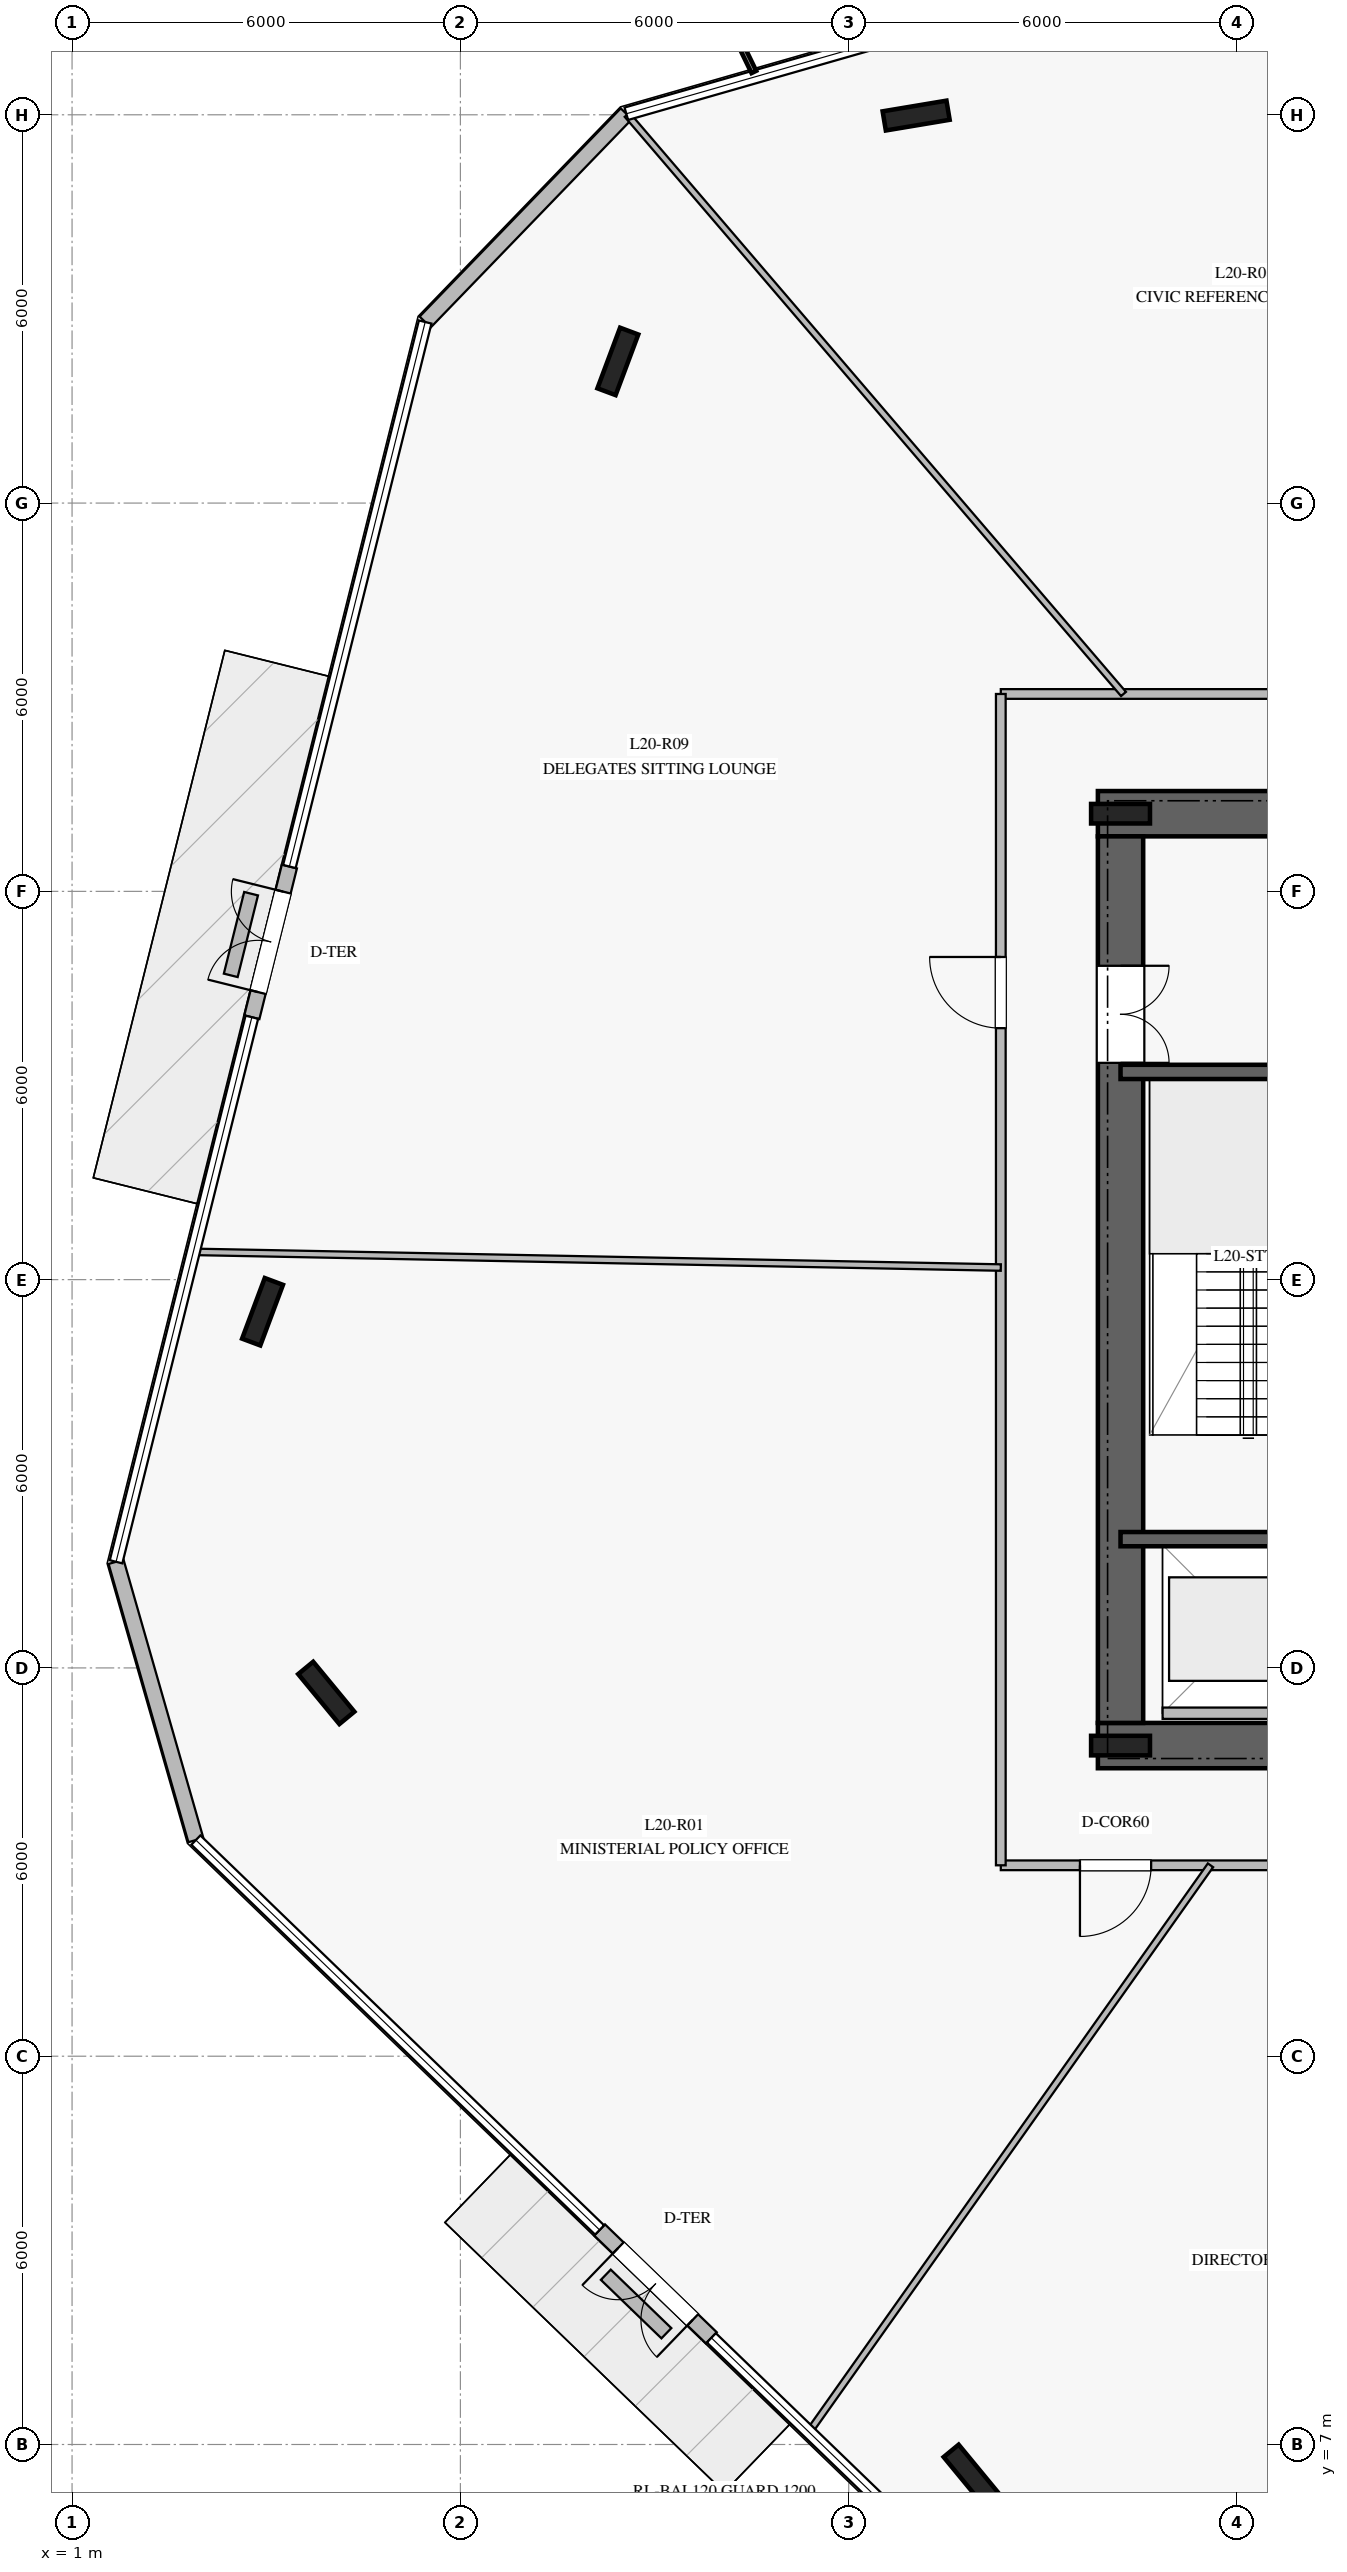
"""IFC4 building model, lengths in metres.
Left out: names, types, materials, properties, quantities, classifications, styles, units other than length and angle.
Written with IfcOpenShell. Run it as: python <this file> out.ifc"""

import sys

from ifc_helpers import new_model, si_unit, direction, frame, frame_2d, origin, origin_2d, place, context, subcontext, project, spatial, rectangle, i_section, extrude, element, fill, save


model = new_model("IFC4")
c1 = context("Model", 3, precision=1e-05, world=origin(), true_north=direction((0.0, 1.0)))
c2 = subcontext(c1, "Body", "Model", "MODEL_VIEW")
j1 = project(units=[si_unit("LENGTHUNIT", "METRE"), si_unit("PLANEANGLEUNIT", "RADIAN")], contexts=[c1])
p1 = place(None, origin())
s1 = spatial("IfcSite", under=j1, at=p1, CompositionType="ELEMENT")
p2 = place(p1, origin())
s2 = spatial("IfcBuilding", under=s1, at=p2, CompositionType="ELEMENT")
p3 = place(p2, frame((0.0, 0.0, 84.0)))
s3 = spatial("IfcBuildingStorey", under=s2, at=p3, CompositionType="ELEMENT", Elevation=84.0)
p4 = place(p3, frame((16.85, 17.8, 0.0), z_axis=(0.0, 0.0, 1.0), x_axis=(1.0, 0.0, 0.0)))
e1 = element("IfcWall", 1, at=p4, inside=s3, PredefinedType="SHEAR", context=c2, shape_type="SweptSolid", body=[
    extrude(rectangle(XDim=16.3, YDim=0.7, at=frame_2d((8.15, 0.0))), origin(), (0.0, 0.0, 1.0), 3.76),
])
p5 = place(p4, frame((5.1, 0.0, 0.0)))
e2 = element("IfcOpeningElement", 2, at=p5, cuts=e1, PredefinedType="OPENING", context=c2, shape_type="SweptSolid", body=[
    extrude(rectangle(XDim=1.2, YDim=2.25, at=frame_2d((0.6, 1.125))), frame((0.0, 0.36, 0.0), z_axis=(0.0, -1.0, 0.0), x_axis=(1.0, 0.0, 0.0)), (0.0, 0.0, 1.0), 0.72),
])
p6 = place(p4, frame((14.05, 0.0, 0.0)))
e3 = element("IfcOpeningElement", 3, at=p6, cuts=e1, PredefinedType="OPENING", context=c2, shape_type="SweptSolid", body=[
    extrude(rectangle(XDim=0.9, YDim=2.1, at=frame_2d((0.45, 1.05))), frame((0.0, 0.36, 0.0), z_axis=(0.0, -1.0, 0.0), x_axis=(1.0, 0.0, 0.0)), (0.0, 0.0, 1.0), 0.72),
])
p7 = place(p4, frame((7.95, 0.0, 0.0)))
e4 = element("IfcOpeningElement", 4, at=p7, cuts=e1, PredefinedType="OPENING", context=c2, shape_type="SweptSolid", body=[
    extrude(rectangle(XDim=1.1, YDim=2.2, at=frame_2d((0.55, 1.1))), frame((0.0, 0.36, 0.0), z_axis=(0.0, -1.0, 0.0), x_axis=(1.0, 0.0, 0.0)), (0.0, 0.0, 1.0), 0.72),
])
p8 = place(p4, frame((9.925, 0.0, 0.0)))
e5 = element("IfcOpeningElement", 5, at=p8, cuts=e1, PredefinedType="OPENING", context=c2, shape_type="SweptSolid", body=[
    extrude(rectangle(XDim=1.1, YDim=2.2, at=frame_2d((0.55, 1.1))), frame((0.0, 0.36, 0.0), z_axis=(0.0, -1.0, 0.0), x_axis=(1.0, 0.0, 0.0)), (0.0, 0.0, 1.0), 0.72),
])
p9 = place(p4, frame((11.9, 0.0, 0.0)))
e6 = element("IfcOpeningElement", 6, at=p9, cuts=e1, PredefinedType="OPENING", context=c2, shape_type="SweptSolid", body=[
    extrude(rectangle(XDim=1.1, YDim=2.2, at=frame_2d((0.55, 1.1))), frame((0.0, 0.36, 0.0), z_axis=(0.0, -1.0, 0.0), x_axis=(1.0, 0.0, 0.0)), (0.0, 0.0, 1.0), 0.72),
])
p10 = place(p3, frame((33.15, 32.2, 0.0), z_axis=(0.0, 0.0, 1.0), x_axis=(-1.0, 0.0, 0.0)))
e7 = element("IfcWall", 7, at=p10, inside=s3, PredefinedType="SHEAR", context=c2, shape_type="SweptSolid", body=[
    extrude(rectangle(XDim=16.3, YDim=0.7, at=frame_2d((8.15, 0.0))), origin(), (0.0, 0.0, 1.0), 3.76),
])
p11 = place(p10, frame((5.1, 0.0, 0.0)))
e8 = element("IfcOpeningElement", 8, at=p11, cuts=e7, PredefinedType="OPENING", context=c2, shape_type="SweptSolid", body=[
    extrude(rectangle(XDim=1.2, YDim=2.25, at=frame_2d((0.6, 1.125))), frame((0.0, 0.36, 0.0), z_axis=(0.0, -1.0, 0.0), x_axis=(1.0, 0.0, 0.0)), (0.0, 0.0, 1.0), 0.72),
])
p12 = place(p3, frame((17.2, 31.85, 0.0), z_axis=(0.0, 0.0, 1.0), x_axis=(0.0, -1.0, 0.0)))
e9 = element("IfcWall", 9, at=p12, inside=s3, PredefinedType="SHEAR", context=c2, shape_type="SweptSolid", body=[
    extrude(rectangle(XDim=13.7, YDim=0.7, at=frame_2d((6.85, 0.0))), origin(), (0.0, 0.0, 1.0), 3.76),
])
p13 = place(p12, frame((2.0, 0.0, 0.0)))
e10 = element("IfcOpeningElement", 10, at=p13, cuts=e9, PredefinedType="OPENING", context=c2, shape_type="SweptSolid", body=[
    extrude(rectangle(XDim=1.5, YDim=2.2, at=frame_2d((0.75, 1.1))), frame((0.0, 0.36, 0.0), z_axis=(0.0, -1.0, 0.0), x_axis=(1.0, 0.0, 0.0)), (0.0, 0.0, 1.0), 0.72),
])
for number, where, z_axis, x_axis in (
    (11, (17.2, 17.8, 0.0), (0.0, 0.0, 1.0), (1.0, 0.0, 0.0)),
    (12, (17.2, 32.2, 0.0), (0.0, 0.0, 1.0), (1.0, 0.0, 0.0)),
):
    element("IfcColumn", number, at=place(p3, frame(where, z_axis=z_axis, x_axis=x_axis)), inside=s3, PredefinedType="COLUMN", context=c2, shape_type="SweptSolid", body=[
        extrude(i_section(OverallWidth=0.302, OverallDepth=0.91, WebThickness=0.021, FlangeThickness=0.04, at=origin_2d()), origin(), (0.0, 0.0, 1.0), 4.0),
    ])
for number, where, z_axis, x_axis in (
    (13, (17.2, 20.99, 0.0), (0.0, 0.0, 1.0), (1.0, 0.0, 0.0)),
    (14, (17.2, 28.21, 0.0), (0.0, 0.0, 1.0), (1.0, 0.0, 0.0)),
):
    element("IfcWall", number, at=place(p3, frame(where, z_axis=z_axis, x_axis=x_axis)), inside=s3, PredefinedType="SOLIDWALL", context=c2, shape_type="SweptSolid", body=[
        extrude(rectangle(XDim=3.72, YDim=0.22, at=frame_2d((1.86, 0.0))), origin(), (0.0, 0.0, 1.0), 3.76),
    ])
for number, where, z_axis, x_axis in (
    (15, (14.042, 42.988, 0.0), (0.0, 0.0, 1.0), (0.986, 0.165, 0.0)),
    (16, (9.433, 39.189, 0.0), (0.0, 0.0, 1.0), (0.35, 0.937, 0.0)),
    (17, (3.943, 24.504, 0.0), (0.0, 0.0, 1.0), (0.35, 0.937, 0.0)),
    (18, (4.928, 18.614, 0.0), (0.0, 0.0, 1.0), (-0.636, 0.772, 0.0)),
    (19, (14.901, 6.516, 0.0), (0.0, 0.0, 1.0), (-0.636, 0.772, 0.0)),
):
    element("IfcColumn", number, at=place(p3, frame(where, z_axis=z_axis, x_axis=x_axis)), inside=s3, PredefinedType="COLUMN", context=c2, shape_type="SweptSolid", body=[
        extrude(i_section(OverallWidth=0.3, OverallDepth=1.0, WebThickness=0.019, FlangeThickness=0.036, at=origin_2d()), origin(), (0.0, 0.0, 1.0), 4.0),
    ])
p14 = place(p3, frame((9.564, 43.016, 0.0), z_axis=(0.0, 0.0, 1.0), x_axis=(-0.694693843806, -0.719305542435, 0.0)))
e20 = element("IfcWall", 20, at=p14, inside=s3, PredefinedType="STANDARD", context=c2, shape_type="SweptSolid", body=[
    extrude(rectangle(XDim=4.474, YDim=0.24, at=frame_2d((2.237, 0.0))), origin(), (0.0, 0.0, 1.0), 3.76),
])
p15 = place(p3, frame((4.358, 31.384, 0.0), z_axis=(0.0, 0.0, 1.0), x_axis=(-0.241578169312, -0.970381362204, 0.0)))
e21 = element("IfcWall", 21, at=p15, inside=s3, PredefinedType="STANDARD", context=c2, shape_type="SweptSolid", body=[
    extrude(rectangle(XDim=2.4, YDim=0.24, at=frame_2d((1.2, 0.0))), origin(), (0.0, 0.0, 1.0), 3.76),
])
p16 = place(p15, frame((0.4, 0.0, 0.0)))
e22 = element("IfcOpeningElement", 22, at=p16, cuts=e21, PredefinedType="OPENING", context=c2, shape_type="SweptSolid", body=[
    extrude(rectangle(XDim=1.6, YDim=2.25, at=frame_2d((0.8, 1.125))), frame((0.0, 0.13, 0.0), z_axis=(0.0, -1.0, 0.0), x_axis=(1.0, 0.0, 0.0)), (0.0, 0.0, 1.0), 0.26),
])
p17 = place(p3, frame((1.68, 20.64, 0.0), z_axis=(0.0, 0.0, 1.0), x_axis=(0.275679732289, -0.96124954367, 0.0)))
e23 = element("IfcWall", 23, at=p17, inside=s3, PredefinedType="STANDARD", context=c2, shape_type="SweptSolid", body=[
    extrude(rectangle(XDim=4.473, YDim=0.24, at=frame_2d((2.237, 0.0))), origin(), (0.0, 0.0, 1.0), 3.76),
])
p18 = place(p3, frame((9.151, 10.315, 0.0), z_axis=(0.0, 0.0, 1.0), x_axis=(0.719506606337, -0.694485596278, 0.0)))
e24 = element("IfcWall", 24, at=p18, inside=s3, PredefinedType="STANDARD", context=c2, shape_type="SweptSolid", body=[
    extrude(rectangle(XDim=2.4, YDim=0.24, at=frame_2d((1.2, 0.0))), origin(), (0.0, 0.0, 1.0), 3.76),
])
p19 = place(p18, frame((0.4, 0.0, 0.0)))
e25 = element("IfcOpeningElement", 25, at=p19, cuts=e24, PredefinedType="OPENING", context=c2, shape_type="SweptSolid", body=[
    extrude(rectangle(XDim=1.6, YDim=2.25, at=frame_2d((0.8, 1.125))), frame((0.0, 0.13, 0.0), z_axis=(0.0, -1.0, 0.0), x_axis=(1.0, 0.0, 0.0)), (0.0, 0.0, 1.0), 0.26),
])
p20 = place(p3, frame((9.247, 9.623, 0.0), z_axis=(0.0, 0.0, 1.0), x_axis=(0.719288309138, -0.694711687204, 0.0)))
e26 = element("IfcWall", 26, at=p20, inside=s3, PredefinedType="USERDEFINED", context=c2, shape_type="SweptSolid", body=[
    extrude(rectangle(XDim=1.301, YDim=0.22, at=frame_2d((0.651, 0.0))), origin(), (0.0, 0.0, 1.0), 0.4),
])
p21 = place(p3, frame((3.766, 30.964, 0.0), z_axis=(0.0, 0.0, 1.0), x_axis=(-0.241563903991, -0.970384913469, 0.0)))
e27 = element("IfcWall", 27, at=p21, inside=s3, PredefinedType="USERDEFINED", context=c2, shape_type="SweptSolid", body=[
    extrude(rectangle(XDim=1.301, YDim=0.22, at=frame_2d((0.65, 0.0))), origin(), (0.0, 0.0, 1.0), 0.4),
])
p22 = place(p3, frame((17.85, 18.3, 0.0), z_axis=(0.0, 0.0, 1.0), x_axis=(1.0, 0.0, 0.0)))
e28 = element("IfcWall", 28, at=p22, inside=s3, PredefinedType="PARTITIONING", context=c2, shape_type="SweptSolid", body=[
    extrude(rectangle(XDim=2.6, YDim=0.175, at=frame_2d((1.3, 0.0))), origin(), (0.0, 0.0, 1.0), 3.76),
])
p23 = place(p3, frame((15.35, 34.05, 0.0), z_axis=(0.0, 0.0, 1.0), x_axis=(1.0, 0.0, 0.0)))
e29 = element("IfcWall", 29, at=p23, inside=s3, PredefinedType="PARTITIONING", context=c2, shape_type="SweptSolid", body=[
    extrude(rectangle(XDim=19.3, YDim=0.15, at=frame_2d((9.65, 0.0))), origin(), (0.0, 0.0, 1.0), 3.21),
])
p24 = place(p23, frame((16.977, 0.0, 0.0)))
e30 = element("IfcOpeningElement", 30, at=p24, cuts=e29, PredefinedType="OPENING", context=c2, shape_type="SweptSolid", body=[
    extrude(rectangle(XDim=1.1, YDim=2.2, at=frame_2d((0.55, 1.1))), frame((0.0, 0.085, 0.0), z_axis=(0.0, -1.0, 0.0), x_axis=(1.0, 0.0, 0.0)), (0.0, 0.0, 1.0), 0.17),
])
p25 = place(p23, frame((11.996, 0.0, 0.0)))
e31 = element("IfcOpeningElement", 31, at=p25, cuts=e29, PredefinedType="OPENING", context=c2, shape_type="SweptSolid", body=[
    extrude(rectangle(XDim=1.1, YDim=2.2, at=frame_2d((0.55, 1.1))), frame((0.0, 0.085, 0.0), z_axis=(0.0, -1.0, 0.0), x_axis=(1.0, 0.0, 0.0)), (0.0, 0.0, 1.0), 0.17),
])
p26 = place(p23, frame((4.847, 0.0, 0.0)))
e32 = element("IfcOpeningElement", 32, at=p26, cuts=e29, PredefinedType="OPENING", context=c2, shape_type="SweptSolid", body=[
    extrude(rectangle(XDim=1.1, YDim=2.2, at=frame_2d((0.55, 1.1))), frame((0.0, 0.085, 0.0), z_axis=(0.0, -1.0, 0.0), x_axis=(1.0, 0.0, 0.0)), (0.0, 0.0, 1.0), 0.17),
])
p27 = place(p3, frame((34.65, 15.95, 0.0), z_axis=(0.0, 0.0, 1.0), x_axis=(-1.0, 0.0, 0.0)))
e33 = element("IfcWall", 33, at=p27, inside=s3, PredefinedType="PARTITIONING", context=c2, shape_type="SweptSolid", body=[
    extrude(rectangle(XDim=19.3, YDim=0.15, at=frame_2d((9.65, 0.0))), origin(), (0.0, 0.0, 1.0), 3.21),
])
p28 = place(p27, frame((16.977, 0.0, 0.0)))
e34 = element("IfcOpeningElement", 34, at=p28, cuts=e33, PredefinedType="OPENING", context=c2, shape_type="SweptSolid", body=[
    extrude(rectangle(XDim=1.1, YDim=2.2, at=frame_2d((0.55, 1.1))), frame((0.0, 0.085, 0.0), z_axis=(0.0, -1.0, 0.0), x_axis=(1.0, 0.0, 0.0)), (0.0, 0.0, 1.0), 0.17),
])
p29 = place(p27, frame((11.66, 0.0, 0.0)))
e35 = element("IfcOpeningElement", 35, at=p29, cuts=e33, PredefinedType="OPENING", context=c2, shape_type="SweptSolid", body=[
    extrude(rectangle(XDim=1.1, YDim=2.2, at=frame_2d((0.55, 1.1))), frame((0.0, 0.085, 0.0), z_axis=(0.0, -1.0, 0.0), x_axis=(1.0, 0.0, 0.0)), (0.0, 0.0, 1.0), 0.17),
])
p30 = place(p3, frame((15.35, 15.95, 0.0), z_axis=(0.0, 0.0, 1.0), x_axis=(0.0, 1.0, 0.0)))
e36 = element("IfcWall", 36, at=p30, inside=s3, PredefinedType="PARTITIONING", context=c2, shape_type="SweptSolid", body=[
    extrude(rectangle(XDim=18.1, YDim=0.15, at=frame_2d((9.05, 0.0))), origin(), (0.0, 0.0, 1.0), 3.21),
])
p31 = place(p30, frame((12.936, 0.0, 0.0)))
e37 = element("IfcOpeningElement", 37, at=p31, cuts=e36, PredefinedType="OPENING", context=c2, shape_type="SweptSolid", body=[
    extrude(rectangle(XDim=1.1, YDim=2.2, at=frame_2d((0.55, 1.1))), frame((0.0, 0.085, 0.0), z_axis=(0.0, -1.0, 0.0), x_axis=(1.0, 0.0, 0.0)), (0.0, 0.0, 1.0), 0.17),
])
p32 = place(p3, frame((17.246, 34.05, 0.0), z_axis=(0.0, 0.0, 1.0), x_axis=(-0.650642961781, 0.759383787215, 0.0)))
e38 = element("IfcWall", 38, at=p32, inside=s3, PredefinedType="MOVABLE", context=c2, shape_type="SweptSolid", body=[
    extrude(rectangle(XDim=11.787, YDim=0.1, at=frame_2d((5.894, 0.0))), origin(), (0.0, 0.0, 1.0), 3.06),
])
p33 = place(p3, frame((15.35, 25.187, 0.0), z_axis=(0.0, 0.0, 1.0), x_axis=(-0.999811471336, 0.019417048838, 0.0)))
e39 = element("IfcWall", 39, at=p33, inside=s3, PredefinedType="MOVABLE", context=c2, shape_type="SweptSolid", body=[
    extrude(rectangle(XDim=12.46, YDim=0.1, at=frame_2d((6.23, 0.0))), origin(), (0.0, 0.0, 1.0), 3.06),
])
p34 = place(p3, frame((18.59, 15.95, 0.0), z_axis=(0.0, 0.0, 1.0), x_axis=(-0.577987627676, -0.816045527071, 0.0)))
e40 = element("IfcWall", 40, at=p34, inside=s3, PredefinedType="MOVABLE", context=c2, shape_type="SweptSolid", body=[
    extrude(rectangle(XDim=10.715, YDim=0.1, at=frame_2d((5.357, 0.0))), origin(), (0.0, 0.0, 1.0), 3.06),
])
p35 = place(p16, frame((1.6, 0.0, 0.0), z_axis=(0.0, 0.0, 1.0), x_axis=(-1.0, 0.0, 0.0)))
e41 = element("IfcDoor", 41, at=p35, inside=s3, OperationType="DOUBLE_DOOR_SINGLE_SWING", PredefinedType="DOOR", context=c2, shape_type="SweptSolid", body=[
    extrude(rectangle(XDim=1.6, YDim=2.25, at=frame_2d((0.8, 1.125))), frame((0.0, 0.025, 0.0), z_axis=(0.0, -1.0, 0.0), x_axis=(1.0, 0.0, 0.0)), (0.0, 0.0, 1.0), 0.05),
])
fill(e22, e41)
p36 = place(p19, frame((1.6, 0.0, 0.0), z_axis=(0.0, 0.0, 1.0), x_axis=(-1.0, 0.0, 0.0)))
e42 = element("IfcDoor", 42, at=p36, inside=s3, OperationType="DOUBLE_DOOR_SINGLE_SWING", PredefinedType="DOOR", context=c2, shape_type="SweptSolid", body=[
    extrude(rectangle(XDim=1.6, YDim=2.25, at=frame_2d((0.8, 1.125))), frame((0.0, 0.025, 0.0), z_axis=(0.0, -1.0, 0.0), x_axis=(1.0, 0.0, 0.0)), (0.0, 0.0, 1.0), 0.05),
])
fill(e25, e42)
p37 = place(p13, origin())
e43 = element("IfcDoor", 43, at=p37, inside=s3, OperationType="DOUBLE_DOOR_SINGLE_SWING", PredefinedType="DOOR", context=c2, shape_type="SweptSolid", body=[
    extrude(rectangle(XDim=1.5, YDim=2.2, at=frame_2d((0.75, 1.1))), frame((0.0, 0.025, 0.0), z_axis=(0.0, -1.0, 0.0), x_axis=(1.0, 0.0, 0.0)), (0.0, 0.0, 1.0), 0.05),
])
fill(e10, e43)
p38 = place(p28, origin())
e44 = element("IfcDoor", 44, at=p38, inside=s3, OperationType="SINGLE_SWING_RIGHT", PredefinedType="DOOR", context=c2, shape_type="SweptSolid", body=[
    extrude(rectangle(XDim=1.1, YDim=2.2, at=frame_2d((0.55, 1.1))), frame((0.0, 0.025, 0.0), z_axis=(0.0, -1.0, 0.0), x_axis=(1.0, 0.0, 0.0)), (0.0, 0.0, 1.0), 0.05),
])
fill(e34, e44)
p39 = place(p31, origin())
e45 = element("IfcDoor", 45, at=p39, inside=s3, OperationType="SINGLE_SWING_RIGHT", PredefinedType="DOOR", context=c2, shape_type="SweptSolid", body=[
    extrude(rectangle(XDim=1.1, YDim=2.2, at=frame_2d((0.55, 1.1))), frame((0.0, 0.025, 0.0), z_axis=(0.0, -1.0, 0.0), x_axis=(1.0, 0.0, 0.0)), (0.0, 0.0, 1.0), 0.05),
])
fill(e37, e45)
save(model, sys.argv[1])
